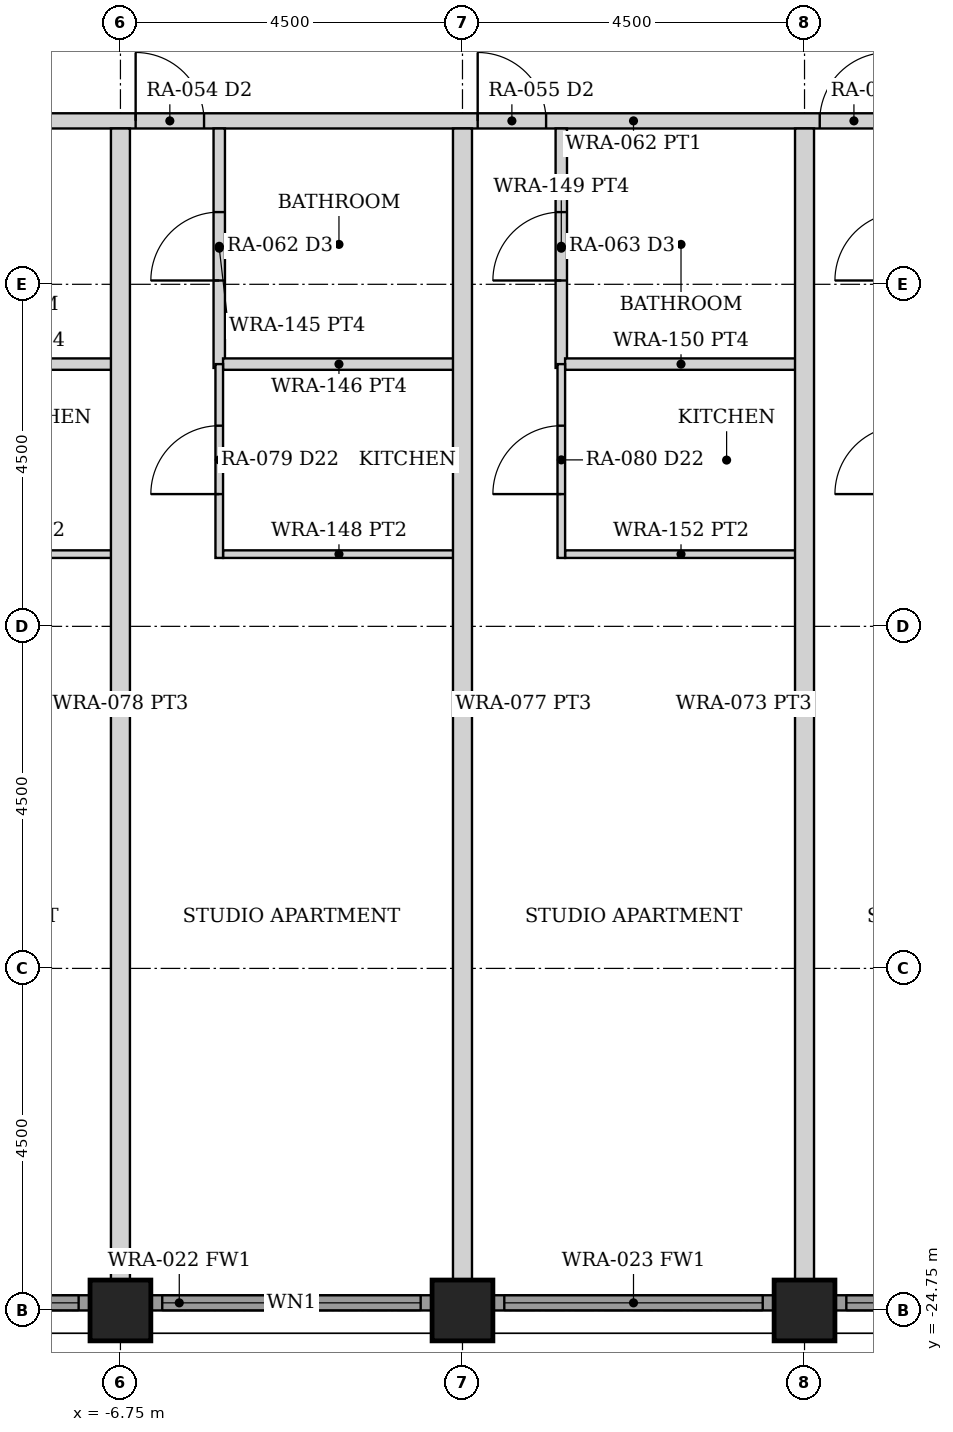
"""IFC4 building model, lengths in metres.
Left out: names, types, materials, properties, quantities, classifications, styles, units other than length and angle.
Written with IfcOpenShell. Run it as: python <this file> out.ifc"""

import sys

from ifc_helpers import new_model, si_unit, direction, frame, frame_2d, origin, origin_2d, place, context, subcontext, project, spatial, rectangle, hollow_rectangle, extrude, element, fill, save


model = new_model("IFC4")
c1 = context("Model", 3, precision=1e-05, world=origin(), true_north=direction((0.0, 1.0)))
c2 = subcontext(c1, "Body", "Model", "MODEL_VIEW")
j1 = project(units=[si_unit("LENGTHUNIT", "METRE"), si_unit("PLANEANGLEUNIT", "RADIAN")], contexts=[c1])
p1 = place(None, origin())
s1 = spatial("IfcSite", under=j1, at=p1, CompositionType="ELEMENT")
p2 = place(p1, origin())
s2 = spatial("IfcBuilding", under=s1, at=p2, CompositionType="ELEMENT")
p3 = place(p2, frame((0.0, 0.0, 30.0)))
s3 = spatial("IfcBuildingStorey", under=s2, at=p3, CompositionType="ELEMENT", Elevation=30.0)
for number, where, z_axis, x_axis in (
    (1, (-6.75, -24.75, 0.0), (0.0, 0.0, 1.0), (0.0, 1.0, 0.0)),
    (2, (-2.25, -24.75, 0.0), (0.0, 0.0, 1.0), (0.0, 1.0, 0.0)),
    (3, (2.25, -24.75, 0.0), (0.0, 0.0, 1.0), (0.0, 1.0, 0.0)),
):
    element("IfcColumn", number, at=place(p3, frame(where, z_axis=z_axis, x_axis=x_axis)), inside=s3, PredefinedType="COLUMN", context=c2, shape_type="SweptSolid", body=[
        extrude(hollow_rectangle(XDim=0.8, YDim=0.8, WallThickness=0.08, at=origin_2d()), origin(), (0.0, 0.0, 1.0), 3.5),
    ])
p4 = place(p3, frame((-10.845, -24.65, 0.0), z_axis=(0.0, 0.0, 1.0), x_axis=(1.0, 0.0, 0.0)))
e4 = element("IfcWall", 4, at=p4, inside=s3, PredefinedType="SOLIDWALL", context=c2, shape_type="SweptSolid", body=[
    extrude(rectangle(XDim=3.69, YDim=0.2, at=frame_2d((1.845, 0.0))), origin(), (0.0, 0.0, 1.0), 2.379),
])
p5 = place(p4, frame((0.145, 0.0, 0.3)))
e5 = element("IfcOpeningElement", 5, at=p5, cuts=e4, PredefinedType="OPENING", context=c2, shape_type="SweptSolid", body=[
    extrude(rectangle(XDim=3.4, YDim=1.929, at=frame_2d((1.7, 0.964))), frame((0.0, 0.11, 0.0), z_axis=(0.0, -1.0, 0.0), x_axis=(1.0, 0.0, 0.0)), (0.0, 0.0, 1.0), 0.22),
])
p6 = place(p3, frame((-6.345, -24.65, 0.0), z_axis=(0.0, 0.0, 1.0), x_axis=(1.0, 0.0, 0.0)))
e6 = element("IfcWall", 6, at=p6, inside=s3, PredefinedType="SOLIDWALL", context=c2, shape_type="SweptSolid", body=[
    extrude(rectangle(XDim=3.69, YDim=0.2, at=frame_2d((1.845, 0.0))), origin(), (0.0, 0.0, 1.0), 2.379),
])
p7 = place(p6, frame((0.145, 0.0, 0.3)))
e7 = element("IfcOpeningElement", 7, at=p7, cuts=e6, PredefinedType="OPENING", context=c2, shape_type="SweptSolid", body=[
    extrude(rectangle(XDim=3.4, YDim=1.929, at=frame_2d((1.7, 0.964))), frame((0.0, 0.11, 0.0), z_axis=(0.0, -1.0, 0.0), x_axis=(1.0, 0.0, 0.0)), (0.0, 0.0, 1.0), 0.22),
])
p8 = place(p3, frame((-1.845, -24.65, 0.0), z_axis=(0.0, 0.0, 1.0), x_axis=(1.0, 0.0, 0.0)))
e8 = element("IfcWall", 8, at=p8, inside=s3, PredefinedType="SOLIDWALL", context=c2, shape_type="SweptSolid", body=[
    extrude(rectangle(XDim=3.69, YDim=0.2, at=frame_2d((1.845, 0.0))), origin(), (0.0, 0.0, 1.0), 2.379),
])
p9 = place(p8, frame((0.145, 0.0, 0.3)))
e9 = element("IfcOpeningElement", 9, at=p9, cuts=e8, PredefinedType="OPENING", context=c2, shape_type="SweptSolid", body=[
    extrude(rectangle(XDim=3.4, YDim=1.929, at=frame_2d((1.7, 0.964))), frame((0.0, 0.11, 0.0), z_axis=(0.0, -1.0, 0.0), x_axis=(1.0, 0.0, 0.0)), (0.0, 0.0, 1.0), 0.22),
])
p10 = place(p3, frame((2.655, -24.65, 0.0), z_axis=(0.0, 0.0, 1.0), x_axis=(1.0, 0.0, 0.0)))
e10 = element("IfcWall", 10, at=p10, inside=s3, PredefinedType="SOLIDWALL", context=c2, shape_type="SweptSolid", body=[
    extrude(rectangle(XDim=3.69, YDim=0.2, at=frame_2d((1.845, 0.0))), origin(), (0.0, 0.0, 1.0), 2.379),
])
p11 = place(p10, frame((0.145, 0.0, 0.3)))
e11 = element("IfcOpeningElement", 11, at=p11, cuts=e10, PredefinedType="OPENING", context=c2, shape_type="SweptSolid", body=[
    extrude(rectangle(XDim=3.4, YDim=1.929, at=frame_2d((1.7, 0.964))), frame((0.0, 0.11, 0.0), z_axis=(0.0, -1.0, 0.0), x_axis=(1.0, 0.0, 0.0)), (0.0, 0.0, 1.0), 0.22),
])
p12 = place(p3, frame((-24.55, -9.1, 0.0), z_axis=(0.0, 0.0, 1.0), x_axis=(1.0, 0.0, 0.0)))
e12 = element("IfcWall", 12, at=p12, inside=s3, PredefinedType="PARTITIONING", context=c2, shape_type="SweptSolid", body=[
    extrude(rectangle(XDim=49.1, YDim=0.2, at=frame_2d((24.55, 0.0))), origin(), (0.0, 0.0, 1.0), 2.373),
])
p13 = place(p12, frame((5.1, 0.0, 0.0)))
e13 = element("IfcOpeningElement", 13, at=p13, cuts=e12, PredefinedType="OPENING", context=c2, shape_type="SweptSolid", body=[
    extrude(rectangle(XDim=0.9, YDim=2.1, at=frame_2d((0.45, 1.05))), frame((0.0, 0.11, 0.0), z_axis=(0.0, -1.0, 0.0), x_axis=(1.0, 0.0, 0.0)), (0.0, 0.0, 1.0), 0.22),
])
p14 = place(p12, frame((9.0, 0.0, 0.0)))
e14 = element("IfcOpeningElement", 14, at=p14, cuts=e12, PredefinedType="OPENING", context=c2, shape_type="SweptSolid", body=[
    extrude(rectangle(XDim=0.9, YDim=2.1, at=frame_2d((0.45, 1.05))), frame((0.0, 0.11, 0.0), z_axis=(0.0, -1.0, 0.0), x_axis=(1.0, 0.0, 0.0)), (0.0, 0.0, 1.0), 0.22),
])
p15 = place(p12, frame((13.5, 0.0, 0.0)))
e15 = element("IfcOpeningElement", 15, at=p15, cuts=e12, PredefinedType="OPENING", context=c2, shape_type="SweptSolid", body=[
    extrude(rectangle(XDim=0.9, YDim=2.1, at=frame_2d((0.45, 1.05))), frame((0.0, 0.11, 0.0), z_axis=(0.0, -1.0, 0.0), x_axis=(1.0, 0.0, 0.0)), (0.0, 0.0, 1.0), 0.22),
])
p16 = place(p12, frame((18.0, 0.0, 0.0)))
e16 = element("IfcOpeningElement", 16, at=p16, cuts=e12, PredefinedType="OPENING", context=c2, shape_type="SweptSolid", body=[
    extrude(rectangle(XDim=0.9, YDim=2.1, at=frame_2d((0.45, 1.05))), frame((0.0, 0.11, 0.0), z_axis=(0.0, -1.0, 0.0), x_axis=(1.0, 0.0, 0.0)), (0.0, 0.0, 1.0), 0.22),
])
p17 = place(p12, frame((22.5, 0.0, 0.0)))
e17 = element("IfcOpeningElement", 17, at=p17, cuts=e12, PredefinedType="OPENING", context=c2, shape_type="SweptSolid", body=[
    extrude(rectangle(XDim=0.9, YDim=2.1, at=frame_2d((0.45, 1.05))), frame((0.0, 0.11, 0.0), z_axis=(0.0, -1.0, 0.0), x_axis=(1.0, 0.0, 0.0)), (0.0, 0.0, 1.0), 0.22),
])
p18 = place(p12, frame((27.0, 0.0, 0.0)))
e18 = element("IfcOpeningElement", 18, at=p18, cuts=e12, PredefinedType="OPENING", context=c2, shape_type="SweptSolid", body=[
    extrude(rectangle(XDim=0.9, YDim=2.1, at=frame_2d((0.45, 1.05))), frame((0.0, 0.11, 0.0), z_axis=(0.0, -1.0, 0.0), x_axis=(1.0, 0.0, 0.0)), (0.0, 0.0, 1.0), 0.22),
])
p19 = place(p12, frame((31.5, 0.0, 0.0)))
e19 = element("IfcOpeningElement", 19, at=p19, cuts=e12, PredefinedType="OPENING", context=c2, shape_type="SweptSolid", body=[
    extrude(rectangle(XDim=0.9, YDim=2.1, at=frame_2d((0.45, 1.05))), frame((0.0, 0.11, 0.0), z_axis=(0.0, -1.0, 0.0), x_axis=(1.0, 0.0, 0.0)), (0.0, 0.0, 1.0), 0.22),
])
p20 = place(p12, frame((36.0, 0.0, 0.0)))
e20 = element("IfcOpeningElement", 20, at=p20, cuts=e12, PredefinedType="OPENING", context=c2, shape_type="SweptSolid", body=[
    extrude(rectangle(XDim=0.9, YDim=2.1, at=frame_2d((0.45, 1.05))), frame((0.0, 0.11, 0.0), z_axis=(0.0, -1.0, 0.0), x_axis=(1.0, 0.0, 0.0)), (0.0, 0.0, 1.0), 0.22),
])
p21 = place(p12, frame((43.1, 0.0, 0.0)))
e21 = element("IfcOpeningElement", 21, at=p21, cuts=e12, PredefinedType="OPENING", context=c2, shape_type="SweptSolid", body=[
    extrude(rectangle(XDim=0.9, YDim=2.1, at=frame_2d((0.45, 1.05))), frame((0.0, 0.11, 0.0), z_axis=(0.0, -1.0, 0.0), x_axis=(1.0, 0.0, 0.0)), (0.0, 0.0, 1.0), 0.22),
])
p22 = place(p3, frame((-9.9, -12.3, 0.0), z_axis=(0.0, 0.0, 1.0), x_axis=(1.0, 0.0, 0.0)))
e22 = element("IfcWall", 22, at=p22, inside=s3, PredefinedType="PARTITIONING", context=c2, shape_type="SweptSolid", body=[
    extrude(rectangle(XDim=3.05, YDim=0.15, at=frame_2d((1.525, 0.0))), origin(), (0.0, 0.0, 1.0), 2.373),
])
p23 = place(p3, frame((-9.9, -14.8, 0.0), z_axis=(0.0, 0.0, 1.0), x_axis=(1.0, 0.0, 0.0)))
e23 = element("IfcWall", 23, at=p23, inside=s3, PredefinedType="PARTITIONING", context=c2, shape_type="SweptSolid", body=[
    extrude(rectangle(XDim=3.05, YDim=0.1, at=frame_2d((1.525, 0.0))), origin(), (0.0, 0.0, 1.0), 2.373),
])
p24 = place(p3, frame((-5.45, -12.35, 0.0), z_axis=(0.0, 0.0, 1.0), x_axis=(0.0, 1.0, 0.0)))
e24 = element("IfcWall", 24, at=p24, inside=s3, PredefinedType="PARTITIONING", context=c2, shape_type="SweptSolid", body=[
    extrude(rectangle(XDim=3.15, YDim=0.15, at=frame_2d((1.575, 0.0))), origin(), (0.0, 0.0, 1.0), 2.373),
])
p25 = place(p24, frame((1.15, 0.0, 0.0)))
e25 = element("IfcOpeningElement", 25, at=p25, cuts=e24, PredefinedType="OPENING", context=c2, shape_type="SweptSolid", body=[
    extrude(rectangle(XDim=0.9, YDim=2.1, at=frame_2d((0.45, 1.05))), frame((0.0, 0.085, 0.0), z_axis=(0.0, -1.0, 0.0), x_axis=(1.0, 0.0, 0.0)), (0.0, 0.0, 1.0), 0.17),
])
p26 = place(p3, frame((-5.4, -12.3, 0.0), z_axis=(0.0, 0.0, 1.0), x_axis=(1.0, 0.0, 0.0)))
e26 = element("IfcWall", 26, at=p26, inside=s3, PredefinedType="PARTITIONING", context=c2, shape_type="SweptSolid", body=[
    extrude(rectangle(XDim=3.05, YDim=0.15, at=frame_2d((1.525, 0.0))), origin(), (0.0, 0.0, 1.0), 2.373),
])
p27 = place(p3, frame((-5.4, -14.8, 0.0), z_axis=(0.0, 0.0, 1.0), x_axis=(1.0, 0.0, 0.0)))
e27 = element("IfcWall", 27, at=p27, inside=s3, PredefinedType="PARTITIONING", context=c2, shape_type="SweptSolid", body=[
    extrude(rectangle(XDim=3.05, YDim=0.1, at=frame_2d((1.525, 0.0))), origin(), (0.0, 0.0, 1.0), 2.373),
])
p28 = place(p3, frame((-5.45, -14.85, 0.0), z_axis=(0.0, 0.0, 1.0), x_axis=(0.0, 1.0, 0.0)))
e28 = element("IfcWall", 28, at=p28, inside=s3, PredefinedType="PARTITIONING", context=c2, shape_type="SweptSolid", body=[
    extrude(rectangle(XDim=2.55, YDim=0.1, at=frame_2d((1.275, 0.0))), origin(), (0.0, 0.0, 1.0), 2.373),
])
p29 = place(p28, frame((0.84, 0.0, 0.0)))
e29 = element("IfcOpeningElement", 29, at=p29, cuts=e28, PredefinedType="OPENING", context=c2, shape_type="SweptSolid", body=[
    extrude(rectangle(XDim=0.9, YDim=2.1, at=frame_2d((0.45, 1.05))), frame((0.0, 0.06, 0.0), z_axis=(0.0, -1.0, 0.0), x_axis=(1.0, 0.0, 0.0)), (0.0, 0.0, 1.0), 0.12),
])
p30 = place(p3, frame((-0.95, -12.35, 0.0), z_axis=(0.0, 0.0, 1.0), x_axis=(0.0, 1.0, 0.0)))
e30 = element("IfcWall", 30, at=p30, inside=s3, PredefinedType="PARTITIONING", context=c2, shape_type="SweptSolid", body=[
    extrude(rectangle(XDim=3.15, YDim=0.15, at=frame_2d((1.575, 0.0))), origin(), (0.0, 0.0, 1.0), 2.373),
])
p31 = place(p30, frame((1.15, 0.0, 0.0)))
e31 = element("IfcOpeningElement", 31, at=p31, cuts=e30, PredefinedType="OPENING", context=c2, shape_type="SweptSolid", body=[
    extrude(rectangle(XDim=0.9, YDim=2.1, at=frame_2d((0.45, 1.05))), frame((0.0, 0.085, 0.0), z_axis=(0.0, -1.0, 0.0), x_axis=(1.0, 0.0, 0.0)), (0.0, 0.0, 1.0), 0.17),
])
p32 = place(p3, frame((-0.9, -12.3, 0.0), z_axis=(0.0, 0.0, 1.0), x_axis=(1.0, 0.0, 0.0)))
e32 = element("IfcWall", 32, at=p32, inside=s3, PredefinedType="PARTITIONING", context=c2, shape_type="SweptSolid", body=[
    extrude(rectangle(XDim=3.05, YDim=0.15, at=frame_2d((1.525, 0.0))), origin(), (0.0, 0.0, 1.0), 2.373),
])
p33 = place(p3, frame((-0.9, -14.8, 0.0), z_axis=(0.0, 0.0, 1.0), x_axis=(1.0, 0.0, 0.0)))
e33 = element("IfcWall", 33, at=p33, inside=s3, PredefinedType="PARTITIONING", context=c2, shape_type="SweptSolid", body=[
    extrude(rectangle(XDim=3.05, YDim=0.1, at=frame_2d((1.525, 0.0))), origin(), (0.0, 0.0, 1.0), 2.373),
])
p34 = place(p3, frame((-0.95, -14.85, 0.0), z_axis=(0.0, 0.0, 1.0), x_axis=(0.0, 1.0, 0.0)))
e34 = element("IfcWall", 34, at=p34, inside=s3, PredefinedType="PARTITIONING", context=c2, shape_type="SweptSolid", body=[
    extrude(rectangle(XDim=2.55, YDim=0.1, at=frame_2d((1.275, 0.0))), origin(), (0.0, 0.0, 1.0), 2.373),
])
p35 = place(p34, frame((0.84, 0.0, 0.0)))
e35 = element("IfcOpeningElement", 35, at=p35, cuts=e34, PredefinedType="OPENING", context=c2, shape_type="SweptSolid", body=[
    extrude(rectangle(XDim=0.9, YDim=2.1, at=frame_2d((0.45, 1.05))), frame((0.0, 0.06, 0.0), z_axis=(0.0, -1.0, 0.0), x_axis=(1.0, 0.0, 0.0)), (0.0, 0.0, 1.0), 0.12),
])
for number, where, z_axis, x_axis in (
    (36, (-6.75, -24.35, 0.0), (0.0, 0.0, 1.0), (0.0, 1.0, 0.0)),
    (37, (-2.25, -24.35, 0.0), (0.0, 0.0, 1.0), (0.0, 1.0, 0.0)),
    (38, (2.25, -24.35, 0.0), (0.0, 0.0, 1.0), (0.0, 1.0, 0.0)),
):
    element("IfcWall", number, at=place(p3, frame(where, z_axis=z_axis, x_axis=x_axis)), inside=s3, PredefinedType="PARTITIONING", context=c2, shape_type="SweptSolid", body=[
        extrude(rectangle(XDim=15.15, YDim=0.25, at=frame_2d((7.575, 0.0))), origin(), (0.0, 0.0, 1.0), 2.373),
    ])
p36 = place(p5, origin())
e39 = element("IfcWindow", 39, at=p36, inside=s3, PartitioningType="SINGLE_PANEL", PredefinedType="WINDOW", context=c2, shape_type="SweptSolid", body=[
    extrude(rectangle(XDim=3.4, YDim=1.929, at=frame_2d((1.7, 0.964))), frame((0.0, 0.03, 0.0), z_axis=(0.0, -1.0, 0.0), x_axis=(1.0, 0.0, 0.0)), (0.0, 0.0, 1.0), 0.06),
])
fill(e5, e39)
p37 = place(p7, origin())
e40 = element("IfcWindow", 40, at=p37, inside=s3, PartitioningType="SINGLE_PANEL", PredefinedType="WINDOW", context=c2, shape_type="SweptSolid", body=[
    extrude(rectangle(XDim=3.4, YDim=1.929, at=frame_2d((1.7, 0.964))), frame((0.0, 0.03, 0.0), z_axis=(0.0, -1.0, 0.0), x_axis=(1.0, 0.0, 0.0)), (0.0, 0.0, 1.0), 0.06),
])
fill(e7, e40)
p38 = place(p9, origin())
e41 = element("IfcWindow", 41, at=p38, inside=s3, PartitioningType="SINGLE_PANEL", PredefinedType="WINDOW", context=c2, shape_type="SweptSolid", body=[
    extrude(rectangle(XDim=3.4, YDim=1.929, at=frame_2d((1.7, 0.964))), frame((0.0, 0.03, 0.0), z_axis=(0.0, -1.0, 0.0), x_axis=(1.0, 0.0, 0.0)), (0.0, 0.0, 1.0), 0.06),
])
fill(e9, e41)
p39 = place(p11, origin())
e42 = element("IfcWindow", 42, at=p39, inside=s3, PartitioningType="SINGLE_PANEL", PredefinedType="WINDOW", context=c2, shape_type="SweptSolid", body=[
    extrude(rectangle(XDim=3.4, YDim=1.929, at=frame_2d((1.7, 0.964))), frame((0.0, 0.03, 0.0), z_axis=(0.0, -1.0, 0.0), x_axis=(1.0, 0.0, 0.0)), (0.0, 0.0, 1.0), 0.06),
])
fill(e11, e42)
p40 = place(p16, origin())
e43 = element("IfcDoor", 43, at=p40, inside=s3, OperationType="SINGLE_SWING_LEFT", PredefinedType="DOOR", context=c2, shape_type="SweptSolid", body=[
    extrude(rectangle(XDim=0.9, YDim=2.1, at=frame_2d((0.45, 1.05))), frame((0.0, 0.025, 0.0), z_axis=(0.0, -1.0, 0.0), x_axis=(1.0, 0.0, 0.0)), (0.0, 0.0, 1.0), 0.05),
])
fill(e16, e43)
p41 = place(p25, origin())
e44 = element("IfcDoor", 44, at=p41, inside=s3, OperationType="SINGLE_SWING_LEFT", PredefinedType="DOOR", context=c2, shape_type="SweptSolid", body=[
    extrude(rectangle(XDim=0.9, YDim=2.1, at=frame_2d((0.45, 1.05))), frame((0.0, 0.025, 0.0), z_axis=(0.0, -1.0, 0.0), x_axis=(1.0, 0.0, 0.0)), (0.0, 0.0, 1.0), 0.05),
])
fill(e25, e44)
p42 = place(p29, origin())
e45 = element("IfcDoor", 45, at=p42, inside=s3, OperationType="SINGLE_SWING_LEFT", PredefinedType="DOOR", context=c2, shape_type="SweptSolid", body=[
    extrude(rectangle(XDim=0.9, YDim=2.1, at=frame_2d((0.45, 1.05))), frame((0.0, 0.025, 0.0), z_axis=(0.0, -1.0, 0.0), x_axis=(1.0, 0.0, 0.0)), (0.0, 0.0, 1.0), 0.05),
])
fill(e29, e45)
p43 = place(p17, origin())
e46 = element("IfcDoor", 46, at=p43, inside=s3, OperationType="SINGLE_SWING_LEFT", PredefinedType="DOOR", context=c2, shape_type="SweptSolid", body=[
    extrude(rectangle(XDim=0.9, YDim=2.1, at=frame_2d((0.45, 1.05))), frame((0.0, 0.025, 0.0), z_axis=(0.0, -1.0, 0.0), x_axis=(1.0, 0.0, 0.0)), (0.0, 0.0, 1.0), 0.05),
])
fill(e17, e46)
p44 = place(p31, origin())
e47 = element("IfcDoor", 47, at=p44, inside=s3, OperationType="SINGLE_SWING_LEFT", PredefinedType="DOOR", context=c2, shape_type="SweptSolid", body=[
    extrude(rectangle(XDim=0.9, YDim=2.1, at=frame_2d((0.45, 1.05))), frame((0.0, 0.025, 0.0), z_axis=(0.0, -1.0, 0.0), x_axis=(1.0, 0.0, 0.0)), (0.0, 0.0, 1.0), 0.05),
])
fill(e31, e47)
p45 = place(p35, origin())
e48 = element("IfcDoor", 48, at=p45, inside=s3, OperationType="SINGLE_SWING_LEFT", PredefinedType="DOOR", context=c2, shape_type="SweptSolid", body=[
    extrude(rectangle(XDim=0.9, YDim=2.1, at=frame_2d((0.45, 1.05))), frame((0.0, 0.025, 0.0), z_axis=(0.0, -1.0, 0.0), x_axis=(1.0, 0.0, 0.0)), (0.0, 0.0, 1.0), 0.05),
])
fill(e35, e48)
p46 = place(p18, origin())
e49 = element("IfcDoor", 49, at=p46, inside=s3, OperationType="SINGLE_SWING_RIGHT", PredefinedType="DOOR", context=c2, shape_type="SweptSolid", body=[
    extrude(rectangle(XDim=0.9, YDim=2.1, at=frame_2d((0.45, 1.05))), frame((0.0, 0.025, 0.0), z_axis=(0.0, -1.0, 0.0), x_axis=(1.0, 0.0, 0.0)), (0.0, 0.0, 1.0), 0.05),
])
fill(e18, e49)
save(model, sys.argv[1])
